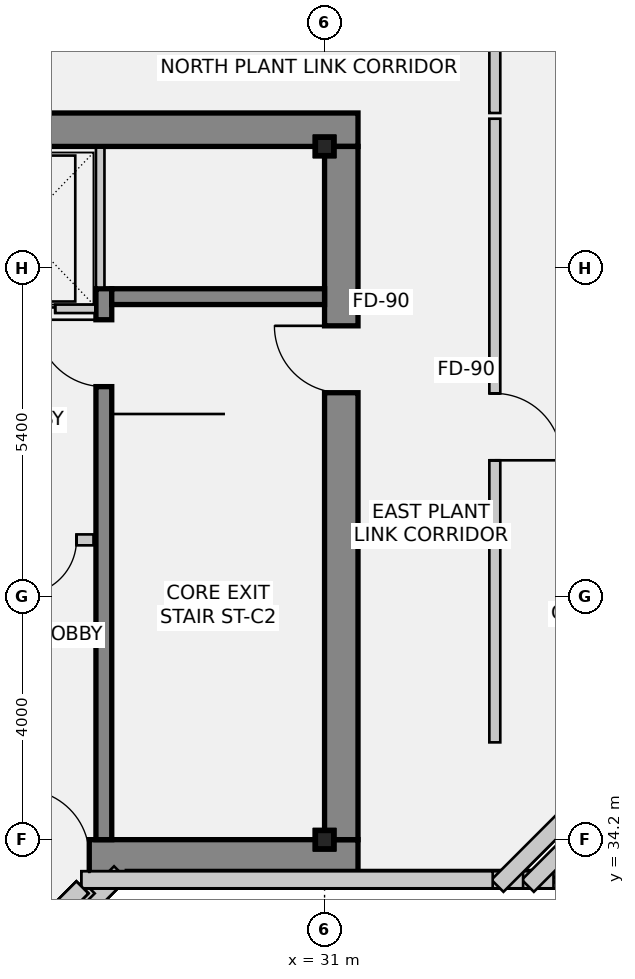
"""IFC4 building model, lengths in metres.
Left out: names, types, materials, properties, quantities, classifications, styles, units other than length and angle.
Written with IfcOpenShell. Run it as: python <this file> out.ifc"""

import sys

from ifc_helpers import new_model, si_unit, direction, frame, frame_2d, origin, origin_2d, place, context, subcontext, project, spatial, rectangle, hollow_rectangle, extrude, source, transform, mapped, element, fill, save


model = new_model("IFC4")
c1 = context("Model", 3, precision=1e-05, world=origin(), true_north=direction((0.0, 1.0)))
c2 = subcontext(c1, "Body", "Model", "MODEL_VIEW")
j1 = project(units=[si_unit("LENGTHUNIT", "METRE"), si_unit("PLANEANGLEUNIT", "RADIAN")], contexts=[c1])
p1 = place(None, origin())
s1 = spatial("IfcSite", under=j1, at=p1, CompositionType="ELEMENT")
p2 = place(p1, origin())
s2 = spatial("IfcBuilding", under=s1, at=p2, CompositionType="ELEMENT")
p3 = place(p2, frame((0.0, 0.0, 309.5)))
s3 = spatial("IfcBuildingStorey", under=s2, at=p3, CompositionType="ELEMENT", Elevation=309.5)
p4 = place(p3, frame((16.05, 45.875, 0.0), z_axis=(0.0, 0.0, 1.0), x_axis=(1.0, 0.0, 0.0)))
e1 = element("IfcWall", 1, at=p4, inside=s3, PredefinedType="SHEAR", context=c2, shape_type="SweptSolid", body=[
    extrude(rectangle(XDim=15.5, YDim=0.55, at=frame_2d((7.75, 0.0))), origin(), (0.0, 0.0, 1.0), 5.4),
])
p5 = place(p3, frame((16.05, 33.925, 0.0), z_axis=(0.0, 0.0, 1.0), x_axis=(1.0, 0.0, 0.0)))
e2 = element("IfcWall", 2, at=p5, inside=s3, PredefinedType="SHEAR", context=c2, shape_type="SweptSolid", body=[
    extrude(rectangle(XDim=15.5, YDim=0.55, at=frame_2d((7.75, 0.0))), origin(), (0.0, 0.0, 1.0), 5.4),
])
m1 = source(origin(), c2, "Body", "SweptSolid", [
    extrude(rectangle(XDim=1.1, YDim=2.15, at=frame_2d((0.55, 1.075))), frame((0.0, 0.285, 0.0), z_axis=(0.0, -1.0, 0.0), x_axis=(1.0, 0.0, 0.0)), (0.0, 0.0, 1.0), 0.57),
])
p6 = place(p5, frame((9.98, 0.0, 0.0)))
e3 = element("IfcOpeningElement", 3, at=p6, cuts=e2, PredefinedType="OPENING", context=c2, shape_type="MappedRepresentation", body=[
    mapped(m1, transform((0.0, 0.0, 0.0), scale=1.0)),
])
p7 = place(p3, frame((31.275, 34.2, 0.0), z_axis=(0.0, 0.0, 1.0), x_axis=(0.0, 1.0, 0.0)))
e4 = element("IfcWall", 4, at=p7, inside=s3, PredefinedType="SHEAR", context=c2, shape_type="SweptSolid", body=[
    extrude(rectangle(XDim=11.4, YDim=0.55, at=frame_2d((5.7, 0.0))), origin(), (0.0, 0.0, 1.0), 5.4),
])
p8 = place(p7, frame((7.35, 0.0, 0.0)))
e5 = element("IfcOpeningElement", 5, at=p8, cuts=e4, PredefinedType="OPENING", context=c2, shape_type="MappedRepresentation", body=[
    mapped(m1, transform((0.0, 0.0, 0.0), scale=1.0)),
])
p9 = place(p3, frame((27.37, 34.2, 0.0), z_axis=(0.0, 0.0, 1.0), x_axis=(0.0, 1.0, 0.0)))
e6 = element("IfcWall", 6, at=p9, inside=s3, PredefinedType="SHEAR", context=c2, shape_type="SweptSolid", body=[
    extrude(rectangle(XDim=9.06, YDim=0.26, at=frame_2d((4.53, 0.0))), origin(), (0.0, 0.0, 1.0), 5.4),
])
m2 = source(origin(), c2, "Body", "SweptSolid", [
    extrude(rectangle(XDim=1.1, YDim=2.15, at=frame_2d((0.55, 1.075))), frame((0.0, 0.14, 0.0), z_axis=(0.0, -1.0, 0.0), x_axis=(1.0, 0.0, 0.0)), (0.0, 0.0, 1.0), 0.28),
])
p10 = place(p9, frame((7.45, 0.0, 0.0)))
e7 = element("IfcOpeningElement", 7, at=p10, cuts=e6, PredefinedType="OPENING", context=c2, shape_type="MappedRepresentation", body=[
    mapped(m2, transform((0.0, 0.0, 0.0), scale=1.0)),
])
p11 = place(p3, frame((27.5, 43.13, 0.0), z_axis=(0.0, 0.0, 1.0), x_axis=(1.0, 0.0, 0.0)))
e8 = element("IfcWall", 8, at=p11, inside=s3, PredefinedType="SHEAR", context=c2, shape_type="SweptSolid", body=[
    extrude(rectangle(XDim=3.5, YDim=0.26, at=frame_2d((1.75, 0.0))), origin(), (0.0, 0.0, 1.0), 5.4),
])
m3 = source(origin(), c2, "Body", "SweptSolid", [
    extrude(hollow_rectangle(XDim=0.3, YDim=0.3, WallThickness=0.016, InnerFilletRadius=0.016, OuterFilletRadius=0.032, at=origin_2d()), origin(), (0.0, 0.0, 1.0), 4.045),
])
p12 = place(p3, frame((31.0, 34.2, 5.4), z_axis=(0.0, 0.0, 1.0), x_axis=(1.0, 0.0, 0.0)))
e9 = element("IfcColumn", 9, at=p12, inside=s3, PredefinedType="COLUMN", context=c2, shape_type="MappedRepresentation", body=[
    mapped(m3, transform((0.0, 0.0, 0.0), scale=1.0)),
])
m4 = source(origin(), c2, "Body", "SweptSolid", [
    extrude(hollow_rectangle(XDim=0.3, YDim=0.3, WallThickness=0.016, InnerFilletRadius=0.016, OuterFilletRadius=0.032, at=origin_2d()), origin(), (0.0, 0.0, 1.0), 4.331),
])
p13 = place(p3, frame((31.0, 45.6, 5.4), z_axis=(0.0, 0.0, 1.0), x_axis=(1.0, 0.0, 0.0)))
e10 = element("IfcColumn", 10, at=p13, inside=s3, PredefinedType="COLUMN", context=c2, shape_type="MappedRepresentation", body=[
    mapped(m4, transform((0.0, 0.0, 0.0), scale=1.0)),
])
m5 = source(origin(), c2, "Body", "SweptSolid", [
    extrude(hollow_rectangle(XDim=0.3, YDim=0.3, WallThickness=0.016, InnerFilletRadius=0.016, OuterFilletRadius=0.032, at=origin_2d()), origin(), (0.0, 0.0, 1.0), 4.492),
])
p14 = place(p3, frame((31.0, 34.2, 9.455), z_axis=(0.0, 0.0, 1.0), x_axis=(1.0, 0.0, 0.0)))
e11 = element("IfcColumn", 11, at=p14, inside=s3, PredefinedType="COLUMN", context=c2, shape_type="MappedRepresentation", body=[
    mapped(m5, transform((0.0, 0.0, 0.0), scale=1.0)),
])
m6 = source(origin(), c2, "Body", "SweptSolid", [
    extrude(hollow_rectangle(XDim=0.3, YDim=0.3, WallThickness=0.016, InnerFilletRadius=0.016, OuterFilletRadius=0.032, at=origin_2d()), origin(), (0.0, 0.0, 1.0), 4.498),
])
p15 = place(p3, frame((31.0, 45.6, 9.74), z_axis=(0.0, 0.0, 1.0), x_axis=(1.0, 0.0, 0.0)))
e12 = element("IfcColumn", 12, at=p15, inside=s3, PredefinedType="COLUMN", context=c2, shape_type="MappedRepresentation", body=[
    mapped(m6, transform((0.0, 0.0, 0.0), scale=1.0)),
])
p16 = place(p3, frame((31.0, 34.2, 13.957), z_axis=(0.0, 0.0, 1.0), x_axis=(1.0, 0.0, 0.0)))
e13 = element("IfcColumn", 13, at=p16, inside=s3, PredefinedType="COLUMN", context=c2, shape_type="MappedRepresentation", body=[
    mapped(m5, transform((0.0, 0.0, 0.0), scale=1.0)),
])
m7 = source(origin(), c2, "Body", "SweptSolid", [
    extrude(hollow_rectangle(XDim=0.3, YDim=0.3, WallThickness=0.016, InnerFilletRadius=0.016, OuterFilletRadius=0.032, at=origin_2d()), origin(), (0.0, 0.0, 1.0), 4.498),
])
p17 = place(p3, frame((31.0, 45.6, 14.248), z_axis=(0.0, 0.0, 1.0), x_axis=(1.0, 0.0, 0.0)))
e14 = element("IfcColumn", 14, at=p17, inside=s3, PredefinedType="COLUMN", context=c2, shape_type="MappedRepresentation", body=[
    mapped(m7, transform((0.0, 0.0, 0.0), scale=1.0)),
])
m8 = source(origin(), c2, "Body", "SweptSolid", [
    extrude(hollow_rectangle(XDim=0.3, YDim=0.3, WallThickness=0.016, InnerFilletRadius=0.016, OuterFilletRadius=0.032, at=origin_2d()), origin(), (0.0, 0.0, 1.0), 3.872),
])
p18 = place(p3, frame((31.0, 34.2, 18.459), z_axis=(0.0, 0.0, 1.0), x_axis=(1.0, 0.0, 0.0)))
e15 = element("IfcColumn", 15, at=p18, inside=s3, PredefinedType="COLUMN", context=c2, shape_type="MappedRepresentation", body=[
    mapped(m8, transform((0.0, 0.0, 0.0), scale=1.0)),
])
m9 = source(origin(), c2, "Body", "SweptSolid", [
    extrude(hollow_rectangle(XDim=0.3, YDim=0.3, WallThickness=0.016, InnerFilletRadius=0.016, OuterFilletRadius=0.032, at=origin_2d()), origin(), (0.0, 0.0, 1.0), 3.878),
])
p19 = place(p3, frame((31.0, 45.6, 18.756), z_axis=(0.0, 0.0, 1.0), x_axis=(1.0, 0.0, 0.0)))
e16 = element("IfcColumn", 16, at=p19, inside=s3, PredefinedType="COLUMN", context=c2, shape_type="MappedRepresentation", body=[
    mapped(m9, transform((0.0, 0.0, 0.0), scale=1.0)),
])
p20 = place(p3, frame((25.588, 31.6, 0.0), z_axis=(0.0, 0.0, 1.0), x_axis=(0.707106781187, 0.707106781187, 0.0)))
e17 = element("IfcWall", 17, at=p20, inside=s3, PredefinedType="SOLIDWALL", context=c2, shape_type="SweptSolid", body=[
    extrude(rectangle(XDim=2.907, YDim=0.3, at=frame_2d((1.454, 0.0))), origin(), (0.0, 0.0, 1.0), 5.1),
])
p21 = place(p3, frame((27.733, 33.55, 0.0), z_axis=(0.0, 0.0, 1.0), x_axis=(1.0, 0.0, 0.0)))
e18 = element("IfcWall", 18, at=p21, inside=s3, PredefinedType="SOLIDWALL", context=c2, shape_type="SweptSolid", body=[
    extrude(rectangle(XDim=8.355, YDim=0.3, at=frame_2d((4.177, 0.0))), origin(), (0.0, 0.0, 1.0), 5.1),
])
p22 = place(p3, frame((35.265, 33.54, 5.4), z_axis=(0.0, 0.0, 1.0), x_axis=(-1.0, 0.0, 0.0)))
e19 = element("IfcWall", 19, at=p22, inside=s3, PredefinedType="SOLIDWALL", context=c2, shape_type="SweptSolid", body=[
    extrude(rectangle(XDim=8.159, YDim=0.28, at=frame_2d((4.08, 0.0))), origin(), (0.0, 0.0, 1.0), 3.08),
])
p23 = place(p3, frame((27.121, 33.415, 5.4), z_axis=(0.0, 0.0, 1.0), x_axis=(-0.707106781187, -0.707106781187, 0.0)))
e20 = element("IfcWall", 20, at=p23, inside=s3, PredefinedType="SOLIDWALL", context=c2, shape_type="SweptSolid", body=[
    extrude(rectangle(XDim=2.908, YDim=0.28, at=frame_2d((1.454, 0.0))), origin(), (0.0, 0.0, 1.0), 3.08),
])
p24 = place(p3, frame((37.735, 36.333, 9.532), z_axis=(0.0, 0.0, 1.0), x_axis=(-0.707106781187, -0.707106781187, 0.0)))
e21 = element("IfcWall", 21, at=p24, inside=s3, PredefinedType="SOLIDWALL", context=c2, shape_type="SweptSolid", body=[
    extrude(rectangle(XDim=4.09, YDim=0.28, at=frame_2d((2.045, 0.0))), origin(), (0.0, 0.0, 1.0), 3.448),
])
p25 = place(p3, frame((34.765, 33.54, 9.338), z_axis=(0.0, 0.0, 1.0), x_axis=(-1.0, 0.0, 0.0)))
e22 = element("IfcWall", 22, at=p25, inside=s3, PredefinedType="SOLIDWALL", context=c2, shape_type="SweptSolid", body=[
    extrude(rectangle(XDim=7.763, YDim=0.28, at=frame_2d((3.882, 0.0))), origin(), (0.0, 0.0, 1.0), 3.642),
])
p26 = place(p3, frame((27.017, 33.415, 9.232), z_axis=(0.0, 0.0, 1.0), x_axis=(-0.707106781187, -0.707106781187, 0.0)))
e23 = element("IfcWall", 23, at=p26, inside=s3, PredefinedType="SOLIDWALL", context=c2, shape_type="SweptSolid", body=[
    extrude(rectangle(XDim=2.908, YDim=0.28, at=frame_2d((1.454, 0.0))), origin(), (0.0, 0.0, 1.0), 3.748),
])
p27 = place(p3, frame((37.135, 36.233, 14.023), z_axis=(0.0, 0.0, 1.0), x_axis=(-0.707106781187, -0.707106781187, 0.0)))
e24 = element("IfcWall", 24, at=p27, inside=s3, PredefinedType="SOLIDWALL", context=c2, shape_type="SweptSolid", body=[
    extrude(rectangle(XDim=3.948, YDim=0.28, at=frame_2d((1.974, 0.0))), origin(), (0.0, 0.0, 1.0), 3.457),
])
p28 = place(p3, frame((34.265, 33.54, 13.838), z_axis=(0.0, 0.0, 1.0), x_axis=(-1.0, 0.0, 0.0)))
e25 = element("IfcWall", 25, at=p28, inside=s3, PredefinedType="SOLIDWALL", context=c2, shape_type="SweptSolid", body=[
    extrude(rectangle(XDim=7.263, YDim=0.28, at=frame_2d((3.632, 0.0))), origin(), (0.0, 0.0, 1.0), 3.642),
])
p29 = place(p3, frame((27.017, 33.415, 13.73), z_axis=(0.0, 0.0, 1.0), x_axis=(-0.707106781187, -0.707106781187, 0.0)))
e26 = element("IfcWall", 26, at=p29, inside=s3, PredefinedType="SOLIDWALL", context=c2, shape_type="SweptSolid", body=[
    extrude(rectangle(XDim=2.908, YDim=0.28, at=frame_2d((1.454, 0.0))), origin(), (0.0, 0.0, 1.0), 3.75),
])
p30 = place(p3, frame((36.535, 36.133, 18.513), z_axis=(0.0, 0.0, 1.0), x_axis=(-0.707074716487, -0.707138844432, 0.0)))
e27 = element("IfcWall", 27, at=p30, inside=s3, PredefinedType="SOLIDWALL", context=c2, shape_type="SweptSolid", body=[
    extrude(rectangle(XDim=3.807, YDim=0.28, at=frame_2d((1.904, 0.0))), origin(), (0.0, 0.0, 1.0), 2.847),
])
p31 = place(p3, frame((33.765, 33.54, 18.337), z_axis=(0.0, 0.0, 1.0), x_axis=(-1.0, 0.0, 0.0)))
e28 = element("IfcWall", 28, at=p31, inside=s3, PredefinedType="SOLIDWALL", context=c2, shape_type="SweptSolid", body=[
    extrude(rectangle(XDim=6.763, YDim=0.28, at=frame_2d((3.382, 0.0))), origin(), (0.0, 0.0, 1.0), 3.023),
])
p32 = place(p3, frame((27.017, 33.415, 18.227), z_axis=(0.0, 0.0, 1.0), x_axis=(-0.707106781187, -0.707106781187, 0.0)))
e29 = element("IfcWall", 29, at=p32, inside=s3, PredefinedType="SOLIDWALL", context=c2, shape_type="SweptSolid", body=[
    extrude(rectangle(XDim=2.908, YDim=0.28, at=frame_2d((1.454, 0.0))), origin(), (0.0, 0.0, 1.0), 3.133),
])
p33 = place(p3, frame((20.37, 42.93, 0.0), z_axis=(0.0, 0.0, 1.0), x_axis=(1.0, 0.0, 0.0)))
e30 = element("IfcWall", 30, at=p33, inside=s3, PredefinedType="SOLIDWALL", context=c2, shape_type="SweptSolid", body=[
    extrude(rectangle(XDim=6.86, YDim=0.14, at=frame_2d((3.43, 0.0))), origin(), (0.0, 0.0, 1.0), 5.1),
])
m10 = source(origin(), c2, "Body", "SweptSolid", [
    extrude(rectangle(XDim=1.1, YDim=2.15, at=frame_2d((0.55, 1.075))), frame((0.0, 0.08, 0.0), z_axis=(0.0, -1.0, 0.0), x_axis=(1.0, 0.0, 0.0)), (0.0, 0.0, 1.0), 0.16),
])
p34 = place(p33, frame((0.5, 0.0, 0.0)))
e31 = element("IfcOpeningElement", 31, at=p34, cuts=e30, PredefinedType="OPENING", context=c2, shape_type="MappedRepresentation", body=[
    mapped(m10, transform((0.0, 0.0, 0.0), scale=1.0)),
])
p35 = place(p33, frame((2.7, 0.0, 0.0)))
e32 = element("IfcOpeningElement", 32, at=p35, cuts=e30, PredefinedType="OPENING", context=c2, shape_type="MappedRepresentation", body=[
    mapped(m10, transform((0.0, 0.0, 0.0), scale=1.0)),
])
p36 = place(p33, frame((5.1, 0.0, 0.0)))
e33 = element("IfcOpeningElement", 33, at=p36, cuts=e30, PredefinedType="OPENING", context=c2, shape_type="MappedRepresentation", body=[
    mapped(m10, transform((0.0, 0.0, 0.0), scale=1.0)),
])
p37 = place(p3, frame((27.31, 43.28, 0.0), z_axis=(0.0, 0.0, 1.0), x_axis=(0.0, 1.0, 0.0)))
e34 = element("IfcWall", 34, at=p37, inside=s3, PredefinedType="SOLIDWALL", context=c2, shape_type="SweptSolid", body=[
    extrude(rectangle(XDim=2.3, YDim=0.14, at=frame_2d((1.15, 0.0))), origin(), (0.0, 0.0, 1.0), 5.1),
])
p38 = place(p3, frame((27.2, 39.13, 0.0), z_axis=(0.0, 0.0, 1.0), x_axis=(-1.0, 0.0, 0.0)))
e35 = element("IfcWall", 35, at=p38, inside=s3, PredefinedType="PARTITIONING", context=c2, shape_type="SweptSolid", body=[
    extrude(rectangle(XDim=6.78, YDim=0.18, at=frame_2d((3.39, 0.0))), origin(), (0.0, 0.0, 1.0), 5.1),
])
m11 = source(origin(), c2, "Body", "SweptSolid", [
    extrude(rectangle(XDim=0.9, YDim=2.15, at=frame_2d((0.45, 1.075))), frame((0.0, 0.1, 0.0), z_axis=(0.0, -1.0, 0.0), x_axis=(1.0, 0.0, 0.0)), (0.0, 0.0, 1.0), 0.2),
])
p39 = place(p38, frame((0.28, 0.0, 0.0)))
e36 = element("IfcOpeningElement", 36, at=p39, cuts=e35, PredefinedType="OPENING", context=c2, shape_type="MappedRepresentation", body=[
    mapped(m11, transform((0.0, 0.0, 0.0), scale=1.0)),
])
p40 = place(p3, frame((33.8, 48.456, 0.0), z_axis=(0.0, 0.0, 1.0), x_axis=(0.0, -1.0, 0.0)))
e37 = element("IfcWall", 37, at=p40, inside=s3, PredefinedType="PARTITIONING", context=c2, shape_type="SweptSolid", body=[
    extrude(rectangle(XDim=2.306, YDim=0.18, at=frame_2d((1.153, 0.0))), origin(), (0.0, 0.0, 1.0), 5.1),
])
p41 = place(p3, frame((33.8, 46.056, 0.0), z_axis=(0.0, 0.0, 1.0), x_axis=(0.0, -1.0, 0.0)))
e38 = element("IfcWall", 38, at=p41, inside=s3, PredefinedType="PARTITIONING", context=c2, shape_type="SweptSolid", body=[
    extrude(rectangle(XDim=10.256, YDim=0.18, at=frame_2d((5.128, 0.0))), origin(), (0.0, 0.0, 1.0), 5.1),
])
m12 = source(origin(), c2, "Body", "SweptSolid", [
    extrude(rectangle(XDim=1.1, YDim=2.15, at=frame_2d((0.55, 1.075))), frame((0.0, 0.1, 0.0), z_axis=(0.0, -1.0, 0.0), x_axis=(1.0, 0.0, 0.0)), (0.0, 0.0, 1.0), 0.2),
])
p42 = place(p41, frame((4.518, 0.0, 0.0)))
e39 = element("IfcOpeningElement", 39, at=p42, cuts=e38, PredefinedType="OPENING", context=c2, shape_type="MappedRepresentation", body=[
    mapped(m12, transform((0.0, 0.0, 0.0), scale=1.0)),
])
p43 = place(p3, frame((0.0, 0.0, 5.1)))
p44 = place(p43, frame((28.6, 40.2, 0.0)))
p45 = place(p44, frame((0.0, 0.0, 0.25)))
e40 = element("IfcWindow", 40, at=p45, inside=s3, PartitioningType="SINGLE_PANEL", PredefinedType="LIGHTDOME", context=c2, shape_type="SweptSolid", body=[
    extrude(rectangle(XDim=2.2, YDim=2.2, at=origin_2d()), origin(), (0.0, 0.0, 1.0), 0.05),
])
m13 = source(origin(), c2, "Body", "SweptSolid", [
    extrude(rectangle(XDim=1.1, YDim=2.15, at=frame_2d((0.55, 1.075))), frame((0.0, 0.025, 0.0), z_axis=(0.0, -1.0, 0.0), x_axis=(1.0, 0.0, 0.0)), (0.0, 0.0, 1.0), 0.05),
])
p46 = place(p36, origin())
e41 = element("IfcDoor", 41, at=p46, inside=s3, OperationType="SLIDING_TO_LEFT", PredefinedType="DOOR", context=c2, shape_type="MappedRepresentation", body=[
    mapped(m13, transform((0.0, 0.0, 0.0), scale=1.0)),
])
fill(e33, e41)
m14 = source(origin(), c2, "Body", "SweptSolid", [
    extrude(rectangle(XDim=1.1, YDim=2.15, at=frame_2d((0.55, 1.075))), frame((0.0, 0.025, 0.0), z_axis=(0.0, -1.0, 0.0), x_axis=(1.0, 0.0, 0.0)), (0.0, 0.0, 1.0), 0.05),
])
p47 = place(p10, origin())
e42 = element("IfcDoor", 42, at=p47, inside=s3, OperationType="SINGLE_SWING_RIGHT", PredefinedType="DOOR", context=c2, shape_type="MappedRepresentation", body=[
    mapped(m14, transform((0.0, 0.0, 0.0), scale=1.0)),
])
fill(e7, e42)
p48 = place(p8, origin())
e43 = element("IfcDoor", 43, at=p48, inside=s3, OperationType="SINGLE_SWING_RIGHT", PredefinedType="DOOR", context=c2, shape_type="MappedRepresentation", body=[
    mapped(m14, transform((0.0, 0.0, 0.0), scale=1.0)),
])
fill(e5, e43)
p49 = place(p6, origin())
e44 = element("IfcDoor", 44, at=p49, inside=s3, OperationType="SINGLE_SWING_LEFT", PredefinedType="DOOR", context=c2, shape_type="MappedRepresentation", body=[
    mapped(m14, transform((0.0, 0.0, 0.0), scale=1.0)),
])
fill(e3, e44)
m15 = source(origin(), c2, "Body", "SweptSolid", [
    extrude(rectangle(XDim=0.9, YDim=2.15, at=frame_2d((0.45, 1.075))), frame((0.0, 0.025, 0.0), z_axis=(0.0, -1.0, 0.0), x_axis=(1.0, 0.0, 0.0)), (0.0, 0.0, 1.0), 0.05),
])
p50 = place(p39, origin())
e45 = element("IfcDoor", 45, at=p50, inside=s3, OperationType="SINGLE_SWING_RIGHT", PredefinedType="DOOR", context=c2, shape_type="MappedRepresentation", body=[
    mapped(m15, transform((0.0, 0.0, 0.0), scale=1.0)),
])
fill(e36, e45)
p51 = place(p42, origin())
e46 = element("IfcDoor", 46, at=p51, inside=s3, OperationType="SINGLE_SWING_RIGHT", PredefinedType="DOOR", context=c2, shape_type="MappedRepresentation", body=[
    mapped(m14, transform((0.0, 0.0, 0.0), scale=1.0)),
])
fill(e39, e46)
save(model, sys.argv[1])
